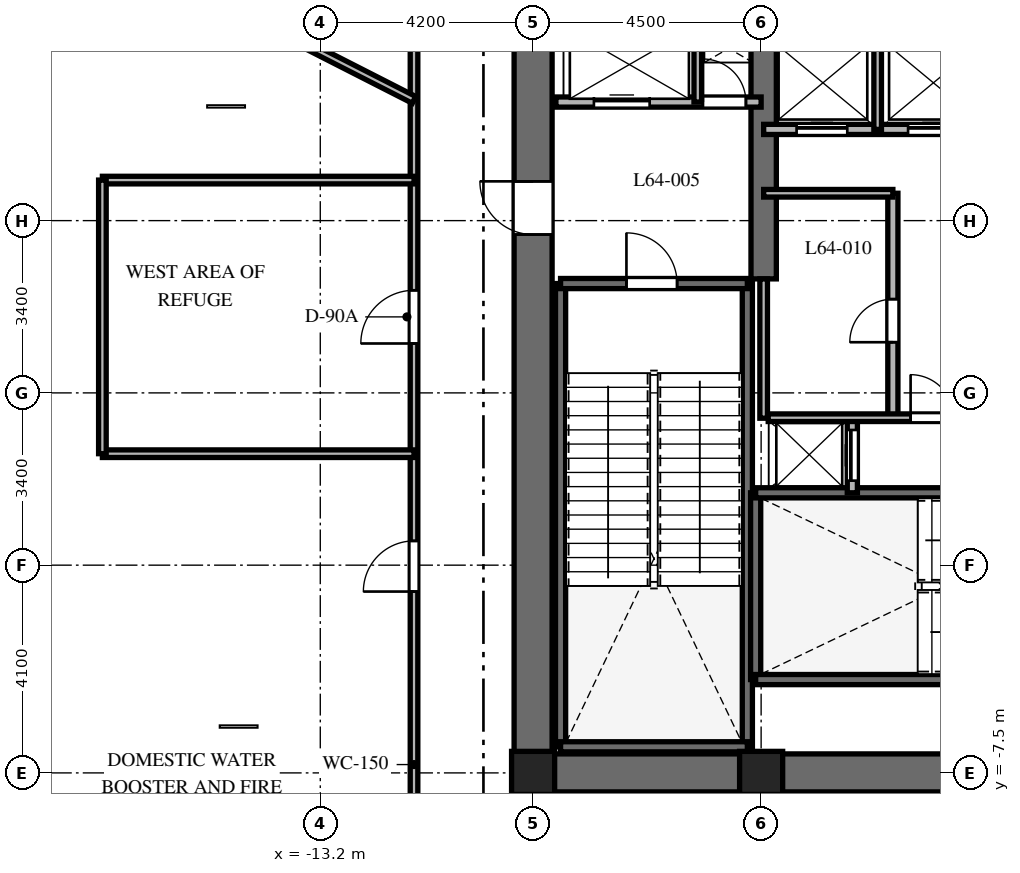
"""IFC4 building model, lengths in metres.
Left out: names, types, materials, properties, quantities, classifications, styles, units other than length and angle.
Written with IfcOpenShell. Run it as: python <this file> out.ifc"""

import sys

from ifc_helpers import new_model, si_unit, direction, frame, frame_2d, origin, origin_2d, place, context, subcontext, project, spatial, rectangle, extrude, element, fill, save


model = new_model("IFC4")
c1 = context("Model", 3, precision=1e-05, world=origin(), true_north=direction((0.0, 1.0)))
c2 = subcontext(c1, "Body", "Model", "MODEL_VIEW")
j1 = project(units=[si_unit("LENGTHUNIT", "METRE"), si_unit("PLANEANGLEUNIT", "RADIAN")], contexts=[c1])
p1 = place(None, origin())
s1 = spatial("IfcSite", under=j1, at=p1, CompositionType="ELEMENT")
p2 = place(p1, origin())
s2 = spatial("IfcBuilding", under=s1, at=p2, CompositionType="ELEMENT")
p3 = place(p2, frame((0.0, 0.0, 255.9)))
s3 = spatial("IfcBuildingStorey", under=s2, at=p3, CompositionType="ELEMENT", Elevation=255.9)
p4 = place(p3, frame((-9.375, -7.5, 0.0), z_axis=(0.0, 0.0, 1.0), x_axis=(1.0, 0.0, 0.0)))
e1 = element("IfcWall", 1, at=p4, inside=s3, PredefinedType="SHEAR", context=c2, shape_type="SweptSolid", body=[
    extrude(rectangle(XDim=18.75, YDim=0.75, at=frame_2d((9.375, 0.0))), origin(), (0.0, 0.0, 1.0), 5.4),
])
p5 = place(p4, frame((9.425, 0.0, 0.0)))
e2 = element("IfcOpeningElement", 2, at=p5, cuts=e1, PredefinedType="OPENING", context=c2, shape_type="SweptSolid", body=[
    extrude(rectangle(XDim=1.0, YDim=2.15, at=frame_2d((0.5, 1.075))), frame((0.0, 0.385, 0.0), z_axis=(0.0, -1.0, 0.0), x_axis=(1.0, 0.0, 0.0)), (0.0, 0.0, 1.0), 0.77),
])
p6 = place(p3, frame((-9.0, -7.125, 0.0), z_axis=(0.0, 0.0, 1.0), x_axis=(0.0, 1.0, 0.0)))
e3 = element("IfcWall", 3, at=p6, inside=s3, PredefinedType="SHEAR", context=c2, shape_type="SweptSolid", body=[
    extrude(rectangle(XDim=14.25, YDim=0.75, at=frame_2d((7.125, 0.0))), origin(), (0.0, 0.0, 1.0), 5.4),
])
p7 = place(p6, frame((10.25, 0.0, 0.0)))
e4 = element("IfcOpeningElement", 4, at=p7, cuts=e3, PredefinedType="OPENING", context=c2, shape_type="SweptSolid", body=[
    extrude(rectangle(XDim=1.05, YDim=2.15, at=frame_2d((0.525, 1.075))), frame((0.0, 0.385, 0.0), z_axis=(0.0, -1.0, 0.0), x_axis=(1.0, 0.0, 0.0)), (0.0, 0.0, 1.0), 0.77),
])
p8 = place(p3, frame((-4.45, 2.25, 0.0), z_axis=(0.0, 0.0, 1.0), x_axis=(0.0, 1.0, 0.0)))
e5 = element("IfcWall", 5, at=p8, inside=s3, PredefinedType="SHEAR", context=c2, shape_type="SweptSolid", body=[
    extrude(rectangle(XDim=4.875, YDim=0.5, at=frame_2d((2.438, 0.0))), origin(), (0.0, 0.0, 1.0), 5.4),
])
for number, where, z_axis, x_axis in (
    (6, (-8.458, -6.985, 0.0), (0.0, 0.0, 1.0), (0.0, 1.0, 0.0)),
    (7, (-4.772, -6.985, 0.0), (0.0, 0.0, 1.0), (0.0, 1.0, 0.0)),
):
    element("IfcWall", number, at=place(p3, frame(where, z_axis=z_axis, x_axis=x_axis)), inside=s3, PredefinedType="SHEAR", context=c2, shape_type="SweptSolid", body=[
        extrude(rectangle(XDim=9.143, YDim=0.2, at=frame_2d((4.572, 0.0))), origin(), (0.0, 0.0, 1.0), 5.4),
    ])
p9 = place(p3, frame((-8.458, -6.985, 0.0), z_axis=(0.0, 0.0, 1.0), x_axis=(1.0, 0.0, 0.0)))
e8 = element("IfcWall", 8, at=p9, inside=s3, PredefinedType="SHEAR", context=c2, shape_type="SweptSolid", body=[
    extrude(rectangle(XDim=3.686, YDim=0.2, at=frame_2d((1.843, 0.0))), origin(), (0.0, 0.0, 1.0), 5.4),
])
p10 = place(p3, frame((-8.458, 2.158, 0.0), z_axis=(0.0, 0.0, 1.0), x_axis=(1.0, 0.0, 0.0)))
e9 = element("IfcWall", 9, at=p10, inside=s3, PredefinedType="SHEAR", context=c2, shape_type="SweptSolid", body=[
    extrude(rectangle(XDim=3.686, YDim=0.2, at=frame_2d((1.843, 0.0))), origin(), (0.0, 0.0, 1.0), 5.4),
])
p11 = place(p10, frame((1.3, 0.0, 0.0)))
e10 = element("IfcOpeningElement", 10, at=p11, cuts=e9, PredefinedType="OPENING", context=c2, shape_type="SweptSolid", body=[
    extrude(rectangle(XDim=1.0, YDim=2.15, at=frame_2d((0.5, 1.075))), frame((0.0, 0.11, 0.0), z_axis=(0.0, -1.0, 0.0), x_axis=(1.0, 0.0, 0.0)), (0.0, 0.0, 1.0), 0.22),
])
p12 = place(p3, frame((-4.608, -5.658, 0.0), z_axis=(0.0, 0.0, 1.0), x_axis=(0.0, 1.0, 0.0)))
e11 = element("IfcWall", 11, at=p12, inside=s3, PredefinedType="SHEAR", context=c2, shape_type="SweptSolid", body=[
    extrude(rectangle(XDim=3.686, YDim=0.2, at=frame_2d((1.843, 0.0))), origin(), (0.0, 0.0, 1.0), 5.4),
])
p13 = place(p3, frame((-4.608, -5.658, 0.0), z_axis=(0.0, 0.0, 1.0), x_axis=(1.0, 0.0, 0.0)))
e12 = element("IfcWall", 12, at=p13, inside=s3, PredefinedType="SHEAR", context=c2, shape_type="SweptSolid", body=[
    extrude(rectangle(XDim=9.166, YDim=0.2, at=frame_2d((4.583, 0.0))), origin(), (0.0, 0.0, 1.0), 5.4),
])
p14 = place(p13, frame((7.45, 0.0, 0.0)))
e13 = element("IfcOpeningElement", 13, at=p14, cuts=e12, PredefinedType="OPENING", context=c2, shape_type="SweptSolid", body=[
    extrude(rectangle(XDim=1.0, YDim=2.15, at=frame_2d((0.5, 1.075))), frame((0.0, 0.11, 0.0), z_axis=(0.0, -1.0, 0.0), x_axis=(1.0, 0.0, 0.0)), (0.0, 0.0, 1.0), 0.22),
])
p15 = place(p3, frame((-4.608, -1.972, 0.0), z_axis=(0.0, 0.0, 1.0), x_axis=(1.0, 0.0, 0.0)))
e14 = element("IfcWall", 14, at=p15, inside=s3, PredefinedType="SHEAR", context=c2, shape_type="SweptSolid", body=[
    extrude(rectangle(XDim=9.166, YDim=0.2, at=frame_2d((4.583, 0.0))), origin(), (0.0, 0.0, 1.0), 5.4),
])
for number, where, z_axis, x_axis in (
    (15, (-9.0, -7.5, 0.0), (0.0, 0.0, 1.0), (1.0, 0.0, 0.0)),
    (16, (-4.5, -7.5, 0.0), (0.0, 0.0, 1.0), (1.0, 0.0, 0.0)),
):
    element("IfcColumn", number, at=place(p3, frame(where, z_axis=z_axis, x_axis=x_axis)), inside=s3, PredefinedType="COLUMN", context=c2, shape_type="SweptSolid", body=[
        extrude(rectangle(XDim=0.85, YDim=0.85, at=origin_2d()), origin(), (0.0, 0.0, 1.0), 5.4),
    ])
p16 = place(p3, frame((-16.324, 19.275, 0.0), z_axis=(0.0, 0.0, 1.0), x_axis=(-0.325083142304, -0.945685439557, 0.0)))
e17 = element("IfcWall", 17, at=p16, inside=s3, PredefinedType="SOLIDWALL", context=c2, shape_type="SweptSolid", body=[
    extrude(rectangle(XDim=20.224, YDim=0.45, at=frame_2d((10.112, 0.0))), origin(), (0.0, 0.0, 1.0), 5.1),
])
p17 = place(p3, frame((-22.74, -2.452, 0.0), z_axis=(0.0, 0.0, 1.0), x_axis=(0.437753424814, -0.899095066755, 0.0)))
e18 = element("IfcWall", 18, at=p17, inside=s3, PredefinedType="SOLIDWALL", context=c2, shape_type="SweptSolid", body=[
    extrude(rectangle(XDim=19.137, YDim=0.45, at=frame_2d((9.569, 0.0))), origin(), (0.0, 0.0, 1.0), 5.1),
])
p18 = place(p3, frame((-8.55, 5.74, 0.0), z_axis=(0.0, 0.0, 1.0), x_axis=(1.0, 0.0, 0.0)))
e19 = element("IfcWall", 19, at=p18, inside=s3, PredefinedType="PARTITIONING", context=c2, shape_type="SweptSolid", body=[
    extrude(rectangle(XDim=4.05, YDim=0.2, at=frame_2d((2.025, 0.0))), origin(), (0.0, 0.0, 1.0), 5.1),
])
p19 = place(p18, frame((0.75, 0.0, 0.0)))
e20 = element("IfcOpeningElement", 20, at=p19, cuts=e19, PredefinedType="OPENING", context=c2, shape_type="SweptSolid", body=[
    extrude(rectangle(XDim=1.1, YDim=2.2, at=frame_2d((0.55, 1.1))), frame((0.0, 0.11, 0.0), z_axis=(0.0, -1.0, 0.0), x_axis=(1.0, 0.0, 0.0)), (0.0, 0.0, 1.0), 0.22),
])
p20 = place(p18, frame((2.9, 0.0, 0.0)))
e21 = element("IfcOpeningElement", 21, at=p20, cuts=e19, PredefinedType="OPENING", context=c2, shape_type="SweptSolid", body=[
    extrude(rectangle(XDim=0.85, YDim=2.03, at=frame_2d((0.425, 1.015))), frame((0.0, 0.11, 0.0), z_axis=(0.0, -1.0, 0.0), x_axis=(1.0, 0.0, 0.0)), (0.0, 0.0, 1.0), 0.22),
])
p21 = place(p3, frame((-5.75, 5.74, 0.0), z_axis=(0.0, 0.0, 1.0), x_axis=(0.0, 1.0, 0.0)))
e22 = element("IfcWall", 22, at=p21, inside=s3, PredefinedType="PARTITIONING", context=c2, shape_type="SweptSolid", body=[
    extrude(rectangle(XDim=1.41, YDim=0.15, at=frame_2d((0.705, 0.0))), origin(), (0.0, 0.0, 1.0), 5.1),
])
p22 = place(p3, frame((-2.7, -1.972, 0.0), z_axis=(0.0, 0.0, 1.0), x_axis=(0.0, 1.0, 0.0)))
e23 = element("IfcWall", 23, at=p22, inside=s3, PredefinedType="PARTITIONING", context=c2, shape_type="SweptSolid", body=[
    extrude(rectangle(XDim=1.472, YDim=0.2, at=frame_2d((0.736, 0.0))), origin(), (0.0, 0.0, 1.0), 5.1),
])
p23 = place(p22, frame((0.24, 0.0, 0.0)))
e24 = element("IfcOpeningElement", 24, at=p23, cuts=e23, PredefinedType="OPENING", context=c2, shape_type="SweptSolid", body=[
    extrude(rectangle(XDim=1.0, YDim=2.2, at=frame_2d((0.5, 1.1))), frame((0.0, 0.11, 0.0), z_axis=(0.0, -1.0, 0.0), x_axis=(1.0, 0.0, 0.0)), (0.0, 0.0, 1.0), 0.22),
])
p24 = place(p3, frame((-4.45, 5.2, 0.0), z_axis=(0.0, 0.0, 1.0), x_axis=(1.0, 0.0, 0.0)))
e25 = element("IfcWall", 25, at=p24, inside=s3, PredefinedType="PARTITIONING", context=c2, shape_type="SweptSolid", body=[
    extrude(rectangle(XDim=4.5, YDim=0.2, at=frame_2d((2.25, 0.0))), origin(), (0.0, 0.0, 1.0), 5.1),
])
p25 = place(p24, frame((0.65, 0.0, 0.0)))
e26 = element("IfcOpeningElement", 26, at=p25, cuts=e25, PredefinedType="OPENING", context=c2, shape_type="SweptSolid", body=[
    extrude(rectangle(XDim=1.0, YDim=2.2, at=frame_2d((0.5, 1.1))), frame((0.0, 0.11, 0.0), z_axis=(0.0, -1.0, 0.0), x_axis=(1.0, 0.0, 0.0)), (0.0, 0.0, 1.0), 0.22),
])
p26 = place(p24, frame((2.85, 0.0, 0.0)))
e27 = element("IfcOpeningElement", 27, at=p26, cuts=e25, PredefinedType="OPENING", context=c2, shape_type="SweptSolid", body=[
    extrude(rectangle(XDim=1.0, YDim=2.2, at=frame_2d((0.5, 1.1))), frame((0.0, 0.11, 0.0), z_axis=(0.0, -1.0, 0.0), x_axis=(1.0, 0.0, 0.0)), (0.0, 0.0, 1.0), 0.22),
])
p27 = place(p3, frame((-2.2, 5.2, 0.0), z_axis=(0.0, 0.0, 1.0), x_axis=(0.0, 1.0, 0.0)))
e28 = element("IfcWall", 28, at=p27, inside=s3, PredefinedType="PARTITIONING", context=c2, shape_type="SweptSolid", body=[
    extrude(rectangle(XDim=1.85, YDim=0.15, at=frame_2d((0.925, 0.0))), origin(), (0.0, 0.0, 1.0), 5.1),
])
p28 = place(p3, frame((-4.45, -0.5, 0.0), z_axis=(0.0, 0.0, 1.0), x_axis=(0.0, 1.0, 0.0)))
e29 = element("IfcWall", 29, at=p28, inside=s3, PredefinedType="PARTITIONING", context=c2, shape_type="SweptSolid", body=[
    extrude(rectangle(XDim=2.75, YDim=0.15, at=frame_2d((1.375, 0.0))), origin(), (0.0, 0.0, 1.0), 5.1),
])
p29 = place(p3, frame((-1.9, -0.5, 0.0), z_axis=(0.0, 0.0, 1.0), x_axis=(0.0, 1.0, 0.0)))
e30 = element("IfcWall", 30, at=p29, inside=s3, PredefinedType="PARTITIONING", context=c2, shape_type="SweptSolid", body=[
    extrude(rectangle(XDim=4.44, YDim=0.2, at=frame_2d((2.22, 0.0))), origin(), (0.0, 0.0, 1.0), 5.1),
])
p30 = place(p29, frame((1.5, 0.0, 0.0)))
e31 = element("IfcOpeningElement", 31, at=p30, cuts=e30, PredefinedType="OPENING", context=c2, shape_type="SweptSolid", body=[
    extrude(rectangle(XDim=0.85, YDim=2.03, at=frame_2d((0.425, 1.015))), frame((0.0, 0.11, 0.0), z_axis=(0.0, -1.0, 0.0), x_axis=(1.0, 0.0, 0.0)), (0.0, 0.0, 1.0), 0.22),
])
p31 = place(p3, frame((-4.45, 3.94, 0.0), z_axis=(0.0, 0.0, 1.0), x_axis=(1.0, 0.0, 0.0)))
e32 = element("IfcWall", 32, at=p31, inside=s3, PredefinedType="PARTITIONING", context=c2, shape_type="SweptSolid", body=[
    extrude(rectangle(XDim=2.55, YDim=0.15, at=frame_2d((1.275, 0.0))), origin(), (0.0, 0.0, 1.0), 5.1),
])
p32 = place(p3, frame((-4.36, -0.49, 0.0), z_axis=(0.0, 0.0, 1.0), x_axis=(1.0, 0.0, 0.0)))
e33 = element("IfcWall", 33, at=p32, inside=s3, PredefinedType="PARTITIONING", context=c2, shape_type="SweptSolid", body=[
    extrude(rectangle(XDim=8.72, YDim=0.15, at=frame_2d((4.36, 0.0))), origin(), (0.0, 0.0, 1.0), 5.1),
])
p33 = place(p32, frame((2.81, 0.0, 0.0)))
e34 = element("IfcOpeningElement", 34, at=p33, cuts=e33, PredefinedType="OPENING", context=c2, shape_type="SweptSolid", body=[
    extrude(rectangle(XDim=0.85, YDim=2.03, at=frame_2d((0.425, 1.015))), frame((0.0, 0.085, 0.0), z_axis=(0.0, -1.0, 0.0), x_axis=(1.0, 0.0, 0.0)), (0.0, 0.0, 1.0), 0.17),
])
p34 = place(p32, frame((4.61, 0.0, 0.0)))
e35 = element("IfcOpeningElement", 35, at=p34, cuts=e33, PredefinedType="OPENING", context=c2, shape_type="SweptSolid", body=[
    extrude(rectangle(XDim=0.85, YDim=2.03, at=frame_2d((0.425, 1.015))), frame((0.0, 0.085, 0.0), z_axis=(0.0, -1.0, 0.0), x_axis=(1.0, 0.0, 0.0)), (0.0, 0.0, 1.0), 0.17),
])
p35 = place(p3, frame((-11.35, -9.85, 0.0), z_axis=(0.0, 0.0, 1.0), x_axis=(0.0, 1.0, 0.0)))
e36 = element("IfcWall", 36, at=p35, inside=s3, PredefinedType="PARTITIONING", context=c2, shape_type="SweptSolid", body=[
    extrude(rectangle(XDim=19.7, YDim=0.15, at=frame_2d((9.85, 0.0))), origin(), (0.0, 0.0, 1.0), 3.29),
])
p36 = place(p35, frame((10.825, 0.0, 0.0)))
e37 = element("IfcOpeningElement", 37, at=p36, cuts=e36, PredefinedType="OPENING", context=c2, shape_type="SweptSolid", body=[
    extrude(rectangle(XDim=1.05, YDim=2.15, at=frame_2d((0.525, 1.075))), frame((0.0, 0.085, 0.0), z_axis=(0.0, -1.0, 0.0), x_axis=(1.0, 0.0, 0.0)), (0.0, 0.0, 1.0), 0.17),
])
p37 = place(p35, frame((17.047, 0.0, 0.0)))
e38 = element("IfcOpeningElement", 38, at=p37, cuts=e36, PredefinedType="OPENING", context=c2, shape_type="SweptSolid", body=[
    extrude(rectangle(XDim=1.0, YDim=2.15, at=frame_2d((0.5, 1.075))), frame((0.0, 0.085, 0.0), z_axis=(0.0, -1.0, 0.0), x_axis=(1.0, 0.0, 0.0)), (0.0, 0.0, 1.0), 0.17),
])
p38 = place(p35, frame((5.929, 0.0, 0.0)))
e39 = element("IfcOpeningElement", 39, at=p38, cuts=e36, PredefinedType="OPENING", context=c2, shape_type="SweptSolid", body=[
    extrude(rectangle(XDim=1.0, YDim=2.15, at=frame_2d((0.5, 1.075))), frame((0.0, 0.085, 0.0), z_axis=(0.0, -1.0, 0.0), x_axis=(1.0, 0.0, 0.0)), (0.0, 0.0, 1.0), 0.17),
])
p39 = place(p3, frame((-17.5, -1.2, 0.0), z_axis=(0.0, 0.0, 1.0), x_axis=(1.0, 0.0, 0.0)))
e40 = element("IfcWall", 40, at=p39, inside=s3, PredefinedType="PARTITIONING", context=c2, shape_type="SweptSolid", body=[
    extrude(rectangle(XDim=6.15, YDim=0.15, at=frame_2d((3.075, 0.0))), origin(), (0.0, 0.0, 1.0), 4.541),
])
p40 = place(p3, frame((-17.5, 4.2, 0.0), z_axis=(0.0, 0.0, 1.0), x_axis=(1.0, 0.0, 0.0)))
e41 = element("IfcWall", 41, at=p40, inside=s3, PredefinedType="PARTITIONING", context=c2, shape_type="SweptSolid", body=[
    extrude(rectangle(XDim=6.15, YDim=0.15, at=frame_2d((3.075, 0.0))), origin(), (0.0, 0.0, 1.0), 3.29),
])
p41 = place(p3, frame((-17.5, -1.2, 0.0), z_axis=(0.0, 0.0, 1.0), x_axis=(0.0, 1.0, 0.0)))
e42 = element("IfcWall", 42, at=p41, inside=s3, PredefinedType="PARTITIONING", context=c2, shape_type="SweptSolid", body=[
    extrude(rectangle(XDim=5.4, YDim=0.15, at=frame_2d((2.7, 0.0))), origin(), (0.0, 0.0, 1.0), 3.29),
])
p42 = place(p3, frame((-11.35, 5.783, 0.0), z_axis=(0.0, 0.0, 1.0), x_axis=(-0.891007832475, 0.453987932074, 0.0)))
e43 = element("IfcWall", 43, at=p42, inside=s3, PredefinedType="PARTITIONING", context=c2, shape_type="SweptSolid", body=[
    extrude(rectangle(XDim=9.18, YDim=0.15, at=frame_2d((4.59, 0.0))), origin(), (0.0, 0.0, 1.0), 3.29),
])
p43 = place(p11, origin())
e44 = element("IfcDoor", 44, at=p43, inside=s3, OperationType="SINGLE_SWING_LEFT", PredefinedType="DOOR", context=c2, shape_type="SweptSolid", body=[
    extrude(rectangle(XDim=1.0, YDim=2.15, at=frame_2d((0.5, 1.075))), frame((0.0, 0.025, 0.0), z_axis=(0.0, -1.0, 0.0), x_axis=(1.0, 0.0, 0.0)), (0.0, 0.0, 1.0), 0.05),
])
fill(e10, e44)
p44 = place(p7, origin())
e45 = element("IfcDoor", 45, at=p44, inside=s3, OperationType="SINGLE_SWING_RIGHT", PredefinedType="DOOR", context=c2, shape_type="SweptSolid", body=[
    extrude(rectangle(XDim=1.05, YDim=2.15, at=frame_2d((0.525, 1.075))), frame((0.0, 0.025, 0.0), z_axis=(0.0, -1.0, 0.0), x_axis=(1.0, 0.0, 0.0)), (0.0, 0.0, 1.0), 0.05),
])
fill(e4, e45)
p45 = place(p19, origin())
e46 = element("IfcDoor", 46, at=p45, inside=s3, OperationType="SLIDING_TO_LEFT", PredefinedType="DOOR", context=c2, shape_type="SweptSolid", body=[
    extrude(rectangle(XDim=1.1, YDim=2.2, at=frame_2d((0.55, 1.1))), frame((0.0, 0.025, 0.0), z_axis=(0.0, -1.0, 0.0), x_axis=(1.0, 0.0, 0.0)), (0.0, 0.0, 1.0), 0.05),
])
fill(e20, e46)
p46 = place(p20, origin())
e47 = element("IfcDoor", 47, at=p46, inside=s3, OperationType="SINGLE_SWING_LEFT", PredefinedType="DOOR", context=c2, shape_type="SweptSolid", body=[
    extrude(rectangle(XDim=0.85, YDim=2.03, at=frame_2d((0.425, 1.015))), frame((0.0, 0.025, 0.0), z_axis=(0.0, -1.0, 0.0), x_axis=(1.0, 0.0, 0.0)), (0.0, 0.0, 1.0), 0.05),
])
fill(e21, e47)
p47 = place(p23, origin())
e48 = element("IfcDoor", 48, at=p47, inside=s3, OperationType="SLIDING_TO_LEFT", PredefinedType="DOOR", context=c2, shape_type="SweptSolid", body=[
    extrude(rectangle(XDim=1.0, YDim=2.2, at=frame_2d((0.5, 1.1))), frame((0.0, 0.025, 0.0), z_axis=(0.0, -1.0, 0.0), x_axis=(1.0, 0.0, 0.0)), (0.0, 0.0, 1.0), 0.05),
])
fill(e24, e48)
p48 = place(p25, origin())
e49 = element("IfcDoor", 49, at=p48, inside=s3, OperationType="SLIDING_TO_LEFT", PredefinedType="DOOR", context=c2, shape_type="SweptSolid", body=[
    extrude(rectangle(XDim=1.0, YDim=2.2, at=frame_2d((0.5, 1.1))), frame((0.0, 0.025, 0.0), z_axis=(0.0, -1.0, 0.0), x_axis=(1.0, 0.0, 0.0)), (0.0, 0.0, 1.0), 0.05),
])
fill(e26, e49)
p49 = place(p26, origin())
e50 = element("IfcDoor", 50, at=p49, inside=s3, OperationType="SLIDING_TO_RIGHT", PredefinedType="DOOR", context=c2, shape_type="SweptSolid", body=[
    extrude(rectangle(XDim=1.0, YDim=2.2, at=frame_2d((0.5, 1.1))), frame((0.0, 0.025, 0.0), z_axis=(0.0, -1.0, 0.0), x_axis=(1.0, 0.0, 0.0)), (0.0, 0.0, 1.0), 0.05),
])
fill(e27, e50)
p50 = place(p30, origin())
e51 = element("IfcDoor", 51, at=p50, inside=s3, OperationType="SINGLE_SWING_LEFT", PredefinedType="DOOR", context=c2, shape_type="SweptSolid", body=[
    extrude(rectangle(XDim=0.85, YDim=2.03, at=frame_2d((0.425, 1.015))), frame((0.0, 0.025, 0.0), z_axis=(0.0, -1.0, 0.0), x_axis=(1.0, 0.0, 0.0)), (0.0, 0.0, 1.0), 0.05),
])
fill(e31, e51)
p51 = place(p33, origin())
e52 = element("IfcDoor", 52, at=p51, inside=s3, OperationType="SINGLE_SWING_LEFT", PredefinedType="DOOR", context=c2, shape_type="SweptSolid", body=[
    extrude(rectangle(XDim=0.85, YDim=2.03, at=frame_2d((0.425, 1.015))), frame((0.0, 0.025, 0.0), z_axis=(0.0, -1.0, 0.0), x_axis=(1.0, 0.0, 0.0)), (0.0, 0.0, 1.0), 0.05),
])
fill(e34, e52)
p52 = place(p36, origin())
e53 = element("IfcDoor", 53, at=p52, inside=s3, OperationType="SINGLE_SWING_LEFT", PredefinedType="DOOR", context=c2, shape_type="SweptSolid", body=[
    extrude(rectangle(XDim=1.05, YDim=2.15, at=frame_2d((0.525, 1.075))), frame((0.0, 0.025, 0.0), z_axis=(0.0, -1.0, 0.0), x_axis=(1.0, 0.0, 0.0)), (0.0, 0.0, 1.0), 0.05),
])
fill(e37, e53)
p53 = place(p38, origin())
e54 = element("IfcDoor", 54, at=p53, inside=s3, OperationType="SINGLE_SWING_LEFT", PredefinedType="DOOR", context=c2, shape_type="SweptSolid", body=[
    extrude(rectangle(XDim=1.0, YDim=2.15, at=frame_2d((0.5, 1.075))), frame((0.0, 0.025, 0.0), z_axis=(0.0, -1.0, 0.0), x_axis=(1.0, 0.0, 0.0)), (0.0, 0.0, 1.0), 0.05),
])
fill(e39, e54)
save(model, sys.argv[1])
